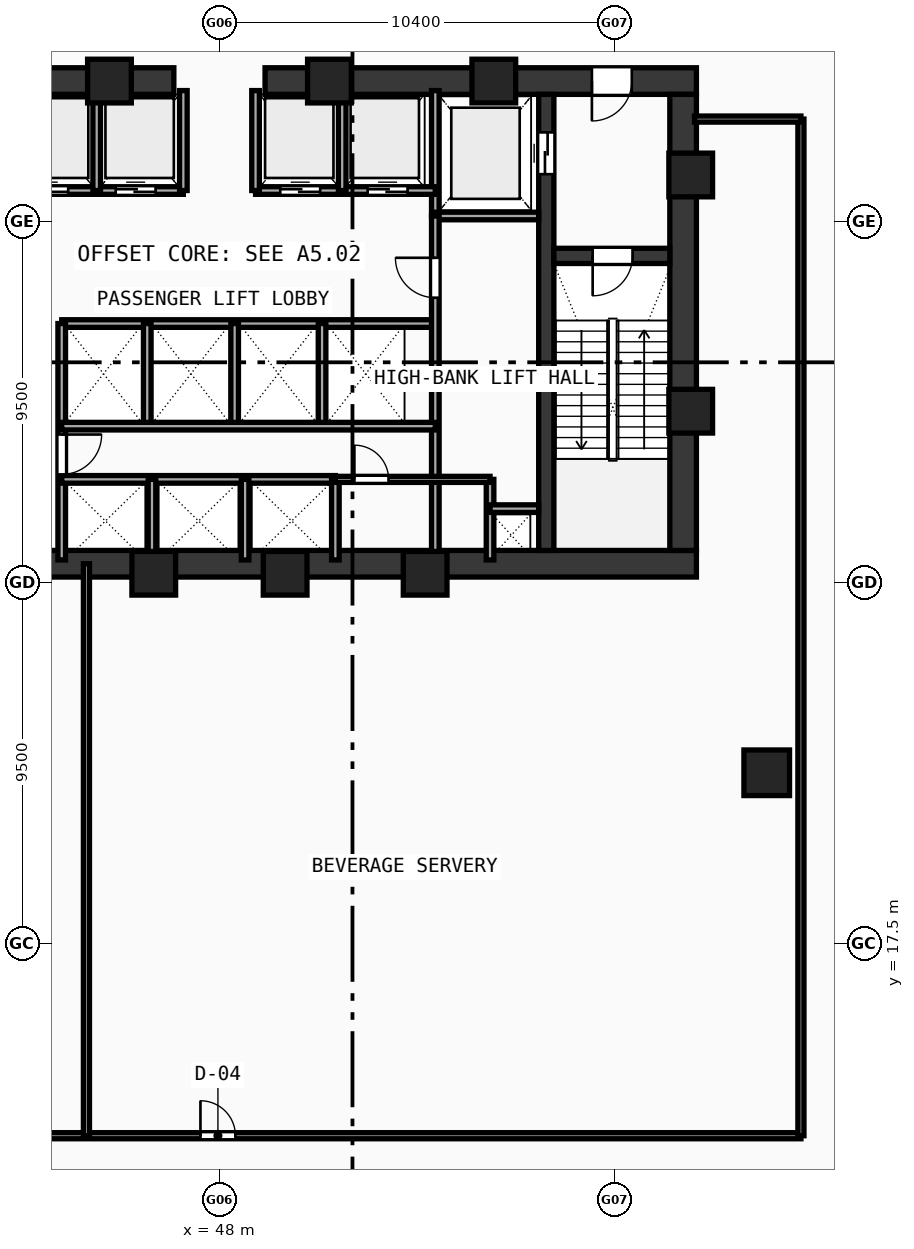
"""IFC4 building model, lengths in metres.
Left out: names, types, materials, properties, quantities, classifications, styles, units other than length and angle.
Written with IfcOpenShell. Run it as: python <this file> out.ifc"""

import sys

from ifc_helpers import new_model, si_unit, direction, frame, frame_2d, origin, origin_with_axes, origin_2d, place, context, subcontext, project, spatial, rectangle, hollow_rectangle, extrude, source, transform, mapped, element, fill, save


model = new_model("IFC4")
c1 = context("Model", 3, precision=1e-05, world=origin(), true_north=direction((0.0, 1.0)))
c2 = subcontext(c1, "Body", "Model", "MODEL_VIEW")
j1 = project(units=[si_unit("LENGTHUNIT", "METRE"), si_unit("PLANEANGLEUNIT", "RADIAN")], contexts=[c1])
p1 = place(None, origin())
s1 = spatial("IfcSite", under=j1, at=p1, CompositionType="ELEMENT")
p2 = place(p1, origin())
s2 = spatial("IfcBuilding", under=s1, at=p2, CompositionType="ELEMENT")
p3 = place(p2, frame((0.0, 0.0, 4.8)))
s3 = spatial("IfcBuildingStorey", under=s2, at=p3, CompositionType="ELEMENT", Elevation=4.8)
p4 = place(p3, frame((35.45, 27.5, 0.0), z_axis=(0.0, 0.0, 1.0), x_axis=(1.0, 0.0, 0.0)))
e1 = element("IfcWall", 1, at=p4, inside=s3, PredefinedType="SHEAR", context=c2, shape_type="SweptSolid", body=[
    extrude(rectangle(XDim=25.1, YDim=0.7, at=frame_2d((12.55, 0.0))), origin(), (0.0, 0.0, 1.0), 4.52),
])
p5 = place(p3, frame((35.45, 40.2, 0.0), z_axis=(0.0, 0.0, 1.0), x_axis=(1.0, 0.0, 0.0)))
e2 = element("IfcWall", 2, at=p5, inside=s3, PredefinedType="SHEAR", context=c2, shape_type="SweptSolid", body=[
    extrude(rectangle(XDim=11.35, YDim=0.7, at=frame_2d((5.675, 0.0))), origin(), (0.0, 0.0, 1.0), 4.52),
])
p6 = place(p5, frame((1.7, 0.0, 0.0)))
e3 = element("IfcOpeningElement", 3, at=p6, cuts=e2, PredefinedType="OPENING", context=c2, shape_type="SweptSolid", body=[
    extrude(rectangle(XDim=1.05, YDim=2.1, at=frame_2d((0.525, 1.05))), frame((0.0, 0.36, 0.0), z_axis=(0.0, -1.0, 0.0), x_axis=(1.0, 0.0, 0.0)), (0.0, 0.0, 1.0), 0.72),
])
p7 = place(p3, frame((49.2, 40.2, 0.0), z_axis=(0.0, 0.0, 1.0), x_axis=(1.0, 0.0, 0.0)))
e4 = element("IfcWall", 4, at=p7, inside=s3, PredefinedType="SHEAR", context=c2, shape_type="SweptSolid", body=[
    extrude(rectangle(XDim=11.35, YDim=0.7, at=frame_2d((5.675, 0.0))), origin(), (0.0, 0.0, 1.0), 4.52),
])
p8 = place(p7, frame((8.6, 0.0, 0.0)))
e5 = element("IfcOpeningElement", 5, at=p8, cuts=e4, PredefinedType="OPENING", context=c2, shape_type="SweptSolid", body=[
    extrude(rectangle(XDim=1.05, YDim=2.1, at=frame_2d((0.525, 1.05))), frame((0.0, 0.36, 0.0), z_axis=(0.0, -1.0, 0.0), x_axis=(1.0, 0.0, 0.0)), (0.0, 0.0, 1.0), 0.72),
])
p9 = place(p3, frame((60.2, 27.85, 0.0), z_axis=(0.0, 0.0, 1.0), x_axis=(0.0, 1.0, 0.0)))
e6 = element("IfcWall", 6, at=p9, inside=s3, PredefinedType="SHEAR", context=c2, shape_type="SweptSolid", body=[
    extrude(rectangle(XDim=12.0, YDim=0.7, at=frame_2d((6.0, 0.0))), origin(), (0.0, 0.0, 1.0), 4.52),
])
p10 = place(p3, frame((56.6, 27.85, 0.0), z_axis=(0.0, 0.0, 1.0), x_axis=(0.0, 1.0, 0.0)))
e7 = element("IfcWall", 7, at=p10, inside=s3, PredefinedType="SHEAR", context=c2, shape_type="SweptSolid", body=[
    extrude(rectangle(XDim=12.0, YDim=0.4, at=frame_2d((6.0, 0.0))), origin(), (0.0, 0.0, 1.0), 4.52),
])
p11 = place(p10, frame((9.9, 0.0, 0.0)))
e8 = element("IfcOpeningElement", 8, at=p11, cuts=e7, PredefinedType="OPENING", context=c2, shape_type="SweptSolid", body=[
    extrude(rectangle(XDim=1.1, YDim=2.1, at=frame_2d((0.55, 1.05))), frame((0.0, 0.21, 0.0), z_axis=(0.0, -1.0, 0.0), x_axis=(1.0, 0.0, 0.0)), (0.0, 0.0, 1.0), 0.42),
])
p12 = place(p3, frame((56.8, 35.6, 0.0), z_axis=(0.0, 0.0, 1.0), x_axis=(1.0, 0.0, 0.0)))
e9 = element("IfcWall", 9, at=p12, inside=s3, PredefinedType="SHEAR", context=c2, shape_type="SweptSolid", body=[
    extrude(rectangle(XDim=3.05, YDim=0.4, at=frame_2d((1.525, 0.0))), origin(), (0.0, 0.0, 1.0), 4.52),
])
p13 = place(p12, frame((1.02, 0.0, 0.0)))
e10 = element("IfcOpeningElement", 10, at=p13, cuts=e9, PredefinedType="OPENING", context=c2, shape_type="SweptSolid", body=[
    extrude(rectangle(XDim=1.05, YDim=2.1, at=frame_2d((0.525, 1.05))), frame((0.0, 0.21, 0.0), z_axis=(0.0, -1.0, 0.0), x_axis=(1.0, 0.0, 0.0)), (0.0, 0.0, 1.0), 0.42),
])
m1 = source(origin(), c2, "Body", "SweptSolid", [
    extrude(hollow_rectangle(XDim=1.15, YDim=1.15, WallThickness=0.048, at=origin_2d()), origin(), (0.0, 0.0, 1.0), 4.8),
])
for number, where, z_axis, x_axis in (
    (11, (46.272, 27.25, -0.28), (0.0, 0.0, 1.0), (1.0, 0.0, 0.0)),
    (12, (49.729, 27.25, -0.28), (0.0, 0.0, 1.0), (1.0, 0.0, 0.0)),
    (13, (53.412, 27.25, -0.28), (0.0, 0.0, 1.0), (1.0, 0.0, 0.0)),
    (14, (60.4, 31.513, -0.28), (0.0, 0.0, 1.0), (1.0, 0.0, 0.0)),
    (15, (60.4, 37.729, -0.28), (0.0, 0.0, 1.0), (1.0, 0.0, 0.0)),
    (16, (55.219, 40.2, -0.28), (0.0, 0.0, 1.0), (1.0, 0.0, 0.0)),
    (17, (50.894, 40.2, -0.28), (0.0, 0.0, 1.0), (1.0, 0.0, 0.0)),
    (18, (45.106, 40.2, -0.28), (0.0, 0.0, 1.0), (1.0, 0.0, 0.0)),
):
    element("IfcColumn", number, at=place(p3, frame(where, z_axis=z_axis, x_axis=x_axis)), inside=s3, PredefinedType="COLUMN", context=c2, shape_type="MappedRepresentation", body=[
        mapped(m1, transform((0.0, 0.0, 0.0), scale=1.0)),
    ])
m2 = source(origin(), c2, "Body", "SweptSolid", [
    extrude(hollow_rectangle(XDim=1.2, YDim=1.2, WallThickness=0.05, at=origin_2d()), origin(), (0.0, 0.0, 1.0), 4.8),
])
p14 = place(p3, frame((62.4, 22.0, -0.28), z_axis=(0.0, 0.0, 1.0), x_axis=(1.0, 0.0, 0.0)))
e19 = element("IfcColumn", 19, at=p14, inside=s3, PredefinedType="COLUMN", context=c2, shape_type="MappedRepresentation", body=[
    mapped(m2, transform((0.0, 0.0, 0.0), scale=1.0)),
])
p15 = place(p3, frame((53.68, 36.65, 0.0), z_axis=(0.0, 0.0, 1.0), x_axis=(0.0, 1.0, 0.0)))
e20 = element("IfcWall", 20, at=p15, inside=s3, PredefinedType="SOLIDWALL", context=c2, shape_type="SweptSolid", body=[
    extrude(rectangle(XDim=3.3, YDim=0.2, at=frame_2d((1.65, 0.0))), origin(), (0.0, 0.0, 1.0), 4.52),
])
p16 = place(p3, frame((53.68, 36.65, 0.0), z_axis=(0.0, 0.0, 1.0), x_axis=(1.0, 0.0, 0.0)))
e21 = element("IfcWall", 21, at=p16, inside=s3, PredefinedType="SOLIDWALL", context=c2, shape_type="SweptSolid", body=[
    extrude(rectangle(XDim=2.72, YDim=0.2, at=frame_2d((1.36, 0.0))), origin(), (0.0, 0.0, 1.0), 4.52),
])
p17 = place(p3, frame((42.32, 37.32, 0.0), z_axis=(0.0, 0.0, 1.0), x_axis=(1.0, 0.0, 0.0)))
e22 = element("IfcWall", 22, at=p17, inside=s3, PredefinedType="SOLIDWALL", context=c2, shape_type="SweptSolid", body=[
    extrude(rectangle(XDim=4.73, YDim=0.2, at=frame_2d((2.365, 0.0))), origin(), (0.0, 0.0, 1.0), 4.52),
])
p18 = place(p17, frame((0.65, 0.0, 0.0)))
e23 = element("IfcOpeningElement", 23, at=p18, cuts=e22, PredefinedType="OPENING", context=c2, shape_type="SweptSolid", body=[
    extrude(rectangle(XDim=1.05, YDim=2.1, at=frame_2d((0.525, 1.05))), frame((0.0, 0.11, 0.0), z_axis=(0.0, -1.0, 0.0), x_axis=(1.0, 0.0, 0.0)), (0.0, 0.0, 1.0), 0.22),
])
p19 = place(p17, frame((2.95, 0.0, 0.0)))
e24 = element("IfcOpeningElement", 24, at=p19, cuts=e22, PredefinedType="OPENING", context=c2, shape_type="SweptSolid", body=[
    extrude(rectangle(XDim=1.05, YDim=2.1, at=frame_2d((0.525, 1.05))), frame((0.0, 0.11, 0.0), z_axis=(0.0, -1.0, 0.0), x_axis=(1.0, 0.0, 0.0)), (0.0, 0.0, 1.0), 0.22),
])
p20 = place(p3, frame((48.95, 37.32, 0.0), z_axis=(0.0, 0.0, 1.0), x_axis=(1.0, 0.0, 0.0)))
e25 = element("IfcWall", 25, at=p20, inside=s3, PredefinedType="SOLIDWALL", context=c2, shape_type="SweptSolid", body=[
    extrude(rectangle(XDim=4.73, YDim=0.2, at=frame_2d((2.365, 0.0))), origin(), (0.0, 0.0, 1.0), 4.52),
])
p21 = place(p20, frame((0.65, 0.0, 0.0)))
e26 = element("IfcOpeningElement", 26, at=p21, cuts=e25, PredefinedType="OPENING", context=c2, shape_type="SweptSolid", body=[
    extrude(rectangle(XDim=1.05, YDim=2.1, at=frame_2d((0.525, 1.05))), frame((0.0, 0.11, 0.0), z_axis=(0.0, -1.0, 0.0), x_axis=(1.0, 0.0, 0.0)), (0.0, 0.0, 1.0), 0.22),
])
p22 = place(p20, frame((2.95, 0.0, 0.0)))
e27 = element("IfcOpeningElement", 27, at=p22, cuts=e25, PredefinedType="OPENING", context=c2, shape_type="SweptSolid", body=[
    extrude(rectangle(XDim=1.05, YDim=2.1, at=frame_2d((0.525, 1.05))), frame((0.0, 0.11, 0.0), z_axis=(0.0, -1.0, 0.0), x_axis=(1.0, 0.0, 0.0)), (0.0, 0.0, 1.0), 0.22),
])
for number, where, z_axis, x_axis in (
    (28, (47.05, 37.32, 0.0), (0.0, 0.0, 1.0), (0.0, 1.0, 0.0)),
    (29, (48.95, 37.32, 0.0), (0.0, 0.0, 1.0), (0.0, 1.0, 0.0)),
    (30, (44.77, 37.32, 0.0), (0.0, 0.0, 1.0), (0.0, 1.0, 0.0)),
    (31, (51.23, 37.32, 0.0), (0.0, 0.0, 1.0), (0.0, 1.0, 0.0)),
):
    element("IfcWall", number, at=place(p3, frame(where, z_axis=z_axis, x_axis=x_axis)), inside=s3, PredefinedType="SOLIDWALL", context=c2, shape_type="SweptSolid", body=[
        extrude(rectangle(XDim=2.63, YDim=0.2, at=frame_2d((1.315, 0.0))), origin(), (0.0, 0.0, 1.0), 4.52),
    ])
p23 = place(p3, frame((43.85, 33.82, 0.0), z_axis=(0.0, 0.0, 1.0), x_axis=(1.0, 0.0, 0.0)))
e32 = element("IfcWall", 32, at=p23, inside=s3, PredefinedType="SOLIDWALL", context=c2, shape_type="SweptSolid", body=[
    extrude(rectangle(XDim=9.83, YDim=0.2, at=frame_2d((4.915, 0.0))), origin(), (0.0, 0.0, 1.0), 4.52),
])
p24 = place(p3, frame((43.85, 27.6, 0.0), z_axis=(0.0, 0.0, 1.0), x_axis=(0.0, 1.0, 0.0)))
e33 = element("IfcWall", 33, at=p24, inside=s3, PredefinedType="SOLIDWALL", context=c2, shape_type="SweptSolid", body=[
    extrude(rectangle(XDim=6.22, YDim=0.2, at=frame_2d((3.11, 0.0))), origin(), (0.0, 0.0, 1.0), 4.52),
])
p25 = place(p24, frame((2.25, 0.0, 0.0)))
e34 = element("IfcOpeningElement", 34, at=p25, cuts=e33, PredefinedType="OPENING", context=c2, shape_type="SweptSolid", body=[
    extrude(rectangle(XDim=1.05, YDim=2.1, at=frame_2d((0.525, 1.05))), frame((0.0, 0.11, 0.0), z_axis=(0.0, -1.0, 0.0), x_axis=(1.0, 0.0, 0.0)), (0.0, 0.0, 1.0), 0.22),
])
p26 = place(p3, frame((53.68, 27.6, 0.0), z_axis=(0.0, 0.0, 1.0), x_axis=(0.0, 1.0, 0.0)))
e35 = element("IfcWall", 35, at=p26, inside=s3, PredefinedType="SOLIDWALL", context=c2, shape_type="SweptSolid", body=[
    extrude(rectangle(XDim=9.05, YDim=0.2, at=frame_2d((4.525, 0.0))), origin(), (0.0, 0.0, 1.0), 4.52),
])
p27 = place(p26, frame((6.9, 0.0, 0.0)))
e36 = element("IfcOpeningElement", 36, at=p27, cuts=e35, PredefinedType="OPENING", context=c2, shape_type="SweptSolid", body=[
    extrude(rectangle(XDim=1.05, YDim=2.1, at=frame_2d((0.525, 1.05))), frame((0.0, 0.11, 0.0), z_axis=(0.0, -1.0, 0.0), x_axis=(1.0, 0.0, 0.0)), (0.0, 0.0, 1.0), 0.22),
])
for number, where, z_axis, x_axis in (
    (37, (46.1, 31.12, 0.0), (0.0, 0.0, 1.0), (0.0, 1.0, 0.0)),
    (38, (48.4, 31.12, 0.0), (0.0, 0.0, 1.0), (0.0, 1.0, 0.0)),
    (39, (50.7, 31.12, 0.0), (0.0, 0.0, 1.0), (0.0, 1.0, 0.0)),
):
    element("IfcWall", number, at=place(p3, frame(where, z_axis=z_axis, x_axis=x_axis)), inside=s3, PredefinedType="SOLIDWALL", context=c2, shape_type="SweptSolid", body=[
        extrude(rectangle(XDim=2.7, YDim=0.2, at=frame_2d((1.35, 0.0))), origin(), (0.0, 0.0, 1.0), 4.52),
    ])
p28 = place(p3, frame((43.85, 29.72, 0.0), z_axis=(0.0, 0.0, 1.0), x_axis=(1.0, 0.0, 0.0)))
e40 = element("IfcWall", 40, at=p28, inside=s3, PredefinedType="SOLIDWALL", context=c2, shape_type="SweptSolid", body=[
    extrude(rectangle(XDim=7.2, YDim=0.2, at=frame_2d((3.6, 0.0))), origin(), (0.0, 0.0, 1.0), 4.52),
])
p29 = place(p3, frame((51.05, 27.6, 0.0), z_axis=(0.0, 0.0, 1.0), x_axis=(0.0, 1.0, 0.0)))
e41 = element("IfcWall", 41, at=p29, inside=s3, PredefinedType="SOLIDWALL", context=c2, shape_type="SweptSolid", body=[
    extrude(rectangle(XDim=2.12, YDim=0.2, at=frame_2d((1.06, 0.0))), origin(), (0.0, 0.0, 1.0), 4.52),
])
p30 = place(p3, frame((43.85, 31.12, 0.0), z_axis=(0.0, 0.0, 1.0), x_axis=(1.0, 0.0, 0.0)))
e42 = element("IfcWall", 42, at=p30, inside=s3, PredefinedType="SOLIDWALL", context=c2, shape_type="SweptSolid", body=[
    extrude(rectangle(XDim=9.83, YDim=0.2, at=frame_2d((4.915, 0.0))), origin(), (0.0, 0.0, 1.0), 4.52),
])
for number, where, z_axis, x_axis in (
    (43, (46.225, 27.6, 0.0), (0.0, 0.0, 1.0), (0.0, 1.0, 0.0)),
    (44, (48.675, 27.6, 0.0), (0.0, 0.0, 1.0), (0.0, 1.0, 0.0)),
    (45, (55.12, 27.6, 0.0), (0.0, 0.0, 1.0), (0.0, 1.0, 0.0)),
):
    element("IfcWall", number, at=place(p3, frame(where, z_axis=z_axis, x_axis=x_axis)), inside=s3, PredefinedType="SOLIDWALL", context=c2, shape_type="SweptSolid", body=[
        extrude(rectangle(XDim=2.12, YDim=0.2, at=frame_2d((1.06, 0.0))), origin(), (0.0, 0.0, 1.0), 4.52),
    ])
p31 = place(p3, frame((55.12, 28.95, 0.0), z_axis=(0.0, 0.0, 1.0), x_axis=(1.0, 0.0, 0.0)))
e46 = element("IfcWall", 46, at=p31, inside=s3, PredefinedType="SOLIDWALL", context=c2, shape_type="SweptSolid", body=[
    extrude(rectangle(XDim=1.28, YDim=0.2, at=frame_2d((0.64, 0.0))), origin(), (0.0, 0.0, 1.0), 4.52),
])
p32 = place(p3, frame((51.05, 29.72, 0.0), z_axis=(0.0, 0.0, 1.0), x_axis=(1.0, 0.0, 0.0)))
e47 = element("IfcWall", 47, at=p32, inside=s3, PredefinedType="PARTITIONING", context=c2, shape_type="SweptSolid", body=[
    extrude(rectangle(XDim=4.07, YDim=0.16, at=frame_2d((2.035, 0.0))), origin(), (0.0, 0.0, 1.0), 4.52),
])
p33 = place(p32, frame((0.5, 0.0, 0.0)))
e48 = element("IfcOpeningElement", 48, at=p33, cuts=e47, PredefinedType="OPENING", context=c2, shape_type="SweptSolid", body=[
    extrude(rectangle(XDim=0.9, YDim=2.1, at=frame_2d((0.45, 1.05))), frame((0.0, 0.09, 0.0), z_axis=(0.0, -1.0, 0.0), x_axis=(1.0, 0.0, 0.0)), (0.0, 0.0, 1.0), 0.18),
])
p34 = place(p3, frame((32.7, 12.45, 0.0), z_axis=(0.0, 0.0, 1.0), x_axis=(1.0, 0.0, 0.0)))
e49 = element("IfcWall", 49, at=p34, inside=s3, PredefinedType="PARTITIONING", context=c2, shape_type="SweptSolid", body=[
    extrude(rectangle(XDim=30.6, YDim=0.16, at=frame_2d((15.3, 0.0))), origin(), (0.0, 0.0, 1.0), 3.62),
])
p35 = place(p34, frame((14.8, 0.0, 0.0)))
e50 = element("IfcOpeningElement", 50, at=p35, cuts=e49, PredefinedType="OPENING", context=c2, shape_type="SweptSolid", body=[
    extrude(rectangle(XDim=0.92, YDim=2.1, at=frame_2d((0.46, 1.05))), frame((0.0, 0.09, 0.0), z_axis=(0.0, -1.0, 0.0), x_axis=(1.0, 0.0, 0.0)), (0.0, 0.0, 1.0), 0.18),
])
p36 = place(p34, frame((5.9, 0.0, 0.0)))
e51 = element("IfcOpeningElement", 51, at=p36, cuts=e49, PredefinedType="OPENING", context=c2, shape_type="SweptSolid", body=[
    extrude(rectangle(XDim=0.94, YDim=2.1, at=frame_2d((0.47, 1.05))), frame((0.0, 0.09, 0.0), z_axis=(0.0, -1.0, 0.0), x_axis=(1.0, 0.0, 0.0)), (0.0, 0.0, 1.0), 0.18),
])
p37 = place(p3, frame((63.3, 12.45, 0.0), z_axis=(0.0, 0.0, 1.0), x_axis=(0.0, 1.0, 0.0)))
e52 = element("IfcWall", 52, at=p37, inside=s3, PredefinedType="PARTITIONING", context=c2, shape_type="SweptSolid", body=[
    extrude(rectangle(XDim=26.75, YDim=0.16, at=frame_2d((13.375, 0.0))), origin(), (0.0, 0.0, 1.0), 3.62),
])
p38 = place(p3, frame((60.5, 39.2, 0.0), z_axis=(0.0, 0.0, 1.0), x_axis=(1.0, 0.0, 0.0)))
e53 = element("IfcWall", 53, at=p38, inside=s3, PredefinedType="PARTITIONING", context=c2, shape_type="SweptSolid", body=[
    extrude(rectangle(XDim=2.8, YDim=0.16, at=frame_2d((1.4, 0.0))), origin(), (0.0, 0.0, 1.0), 3.62),
])
p39 = place(p3, frame((44.5, 12.45, 0.0), z_axis=(0.0, 0.0, 1.0), x_axis=(0.0, 1.0, 0.0)))
e54 = element("IfcWall", 54, at=p39, inside=s3, PredefinedType="PARTITIONING", context=c2, shape_type="SweptSolid", body=[
    extrude(rectangle(XDim=15.05, YDim=0.16, at=frame_2d((7.525, 0.0))), origin(), (0.0, 0.0, 1.0), 3.62),
])
m3 = source(origin(), c2, "Body", "SweptSolid", [
    extrude(rectangle(XDim=1.05, YDim=2.1, at=frame_2d((0.525, 1.05))), frame((0.0, 0.025, 0.0), z_axis=(0.0, -1.0, 0.0), x_axis=(1.0, 0.0, 0.0)), (0.0, 0.0, 1.0), 0.05),
])
p40 = place(p13, frame((1.05, 0.0, 0.0), z_axis=(0.0, 0.0, 1.0), x_axis=(-1.0, 0.0, 0.0)))
e55 = element("IfcDoor", 55, at=p40, inside=s3, OperationType="SINGLE_SWING_RIGHT", PredefinedType="DOOR", context=c2, shape_type="MappedRepresentation", body=[
    mapped(m3, transform((0.0, 0.0, 0.0), scale=1.0)),
])
fill(e10, e55)
p41 = place(p8, frame((1.05, 0.0, 0.0), z_axis=(0.0, 0.0, 1.0), x_axis=(-1.0, 0.0, 0.0)))
e56 = element("IfcDoor", 56, at=p41, inside=s3, OperationType="SINGLE_SWING_RIGHT", PredefinedType="DOOR", context=c2, shape_type="MappedRepresentation", body=[
    mapped(m3, transform((0.0, 0.0, 0.0), scale=1.0)),
])
fill(e5, e56)
m4 = source(origin(), c2, "Body", "SweptSolid", [
    extrude(rectangle(XDim=1.1, YDim=2.1, at=frame_2d((0.55, 1.05))), frame((0.0, 0.025, 0.0), z_axis=(0.0, -1.0, 0.0), x_axis=(1.0, 0.0, 0.0)), (0.0, 0.0, 1.0), 0.05),
])
p42 = place(p11, origin_with_axes())
e57 = element("IfcDoor", 57, at=p42, inside=s3, OperationType="DOUBLE_DOOR_SLIDING", PredefinedType="DOOR", context=c2, shape_type="MappedRepresentation", body=[
    mapped(m4, transform((0.0, 0.0, 0.0), scale=1.0)),
])
fill(e8, e57)
p43 = place(p18, frame((1.05, 0.0, 0.0), z_axis=(0.0, 0.0, 1.0), x_axis=(-1.0, 0.0, 0.0)))
e58 = element("IfcDoor", 58, at=p43, inside=s3, OperationType="DOUBLE_DOOR_SLIDING", PredefinedType="DOOR", context=c2, shape_type="MappedRepresentation", body=[
    mapped(m3, transform((0.0, 0.0, 0.0), scale=1.0)),
])
fill(e23, e58)
p44 = place(p19, frame((1.05, 0.0, 0.0), z_axis=(0.0, 0.0, 1.0), x_axis=(-1.0, 0.0, 0.0)))
e59 = element("IfcDoor", 59, at=p44, inside=s3, OperationType="DOUBLE_DOOR_SLIDING", PredefinedType="DOOR", context=c2, shape_type="MappedRepresentation", body=[
    mapped(m3, transform((0.0, 0.0, 0.0), scale=1.0)),
])
fill(e24, e59)
p45 = place(p21, frame((1.05, 0.0, 0.0), z_axis=(0.0, 0.0, 1.0), x_axis=(-1.0, 0.0, 0.0)))
e60 = element("IfcDoor", 60, at=p45, inside=s3, OperationType="DOUBLE_DOOR_SLIDING", PredefinedType="DOOR", context=c2, shape_type="MappedRepresentation", body=[
    mapped(m3, transform((0.0, 0.0, 0.0), scale=1.0)),
])
fill(e26, e60)
p46 = place(p22, frame((1.05, 0.0, 0.0), z_axis=(0.0, 0.0, 1.0), x_axis=(-1.0, 0.0, 0.0)))
e61 = element("IfcDoor", 61, at=p46, inside=s3, OperationType="DOUBLE_DOOR_SLIDING", PredefinedType="DOOR", context=c2, shape_type="MappedRepresentation", body=[
    mapped(m3, transform((0.0, 0.0, 0.0), scale=1.0)),
])
fill(e27, e61)
p47 = place(p25, frame((1.05, 0.0, 0.0), z_axis=(0.0, 0.0, 1.0), x_axis=(-1.0, 0.0, 0.0)))
e62 = element("IfcDoor", 62, at=p47, inside=s3, OperationType="SINGLE_SWING_LEFT", PredefinedType="DOOR", context=c2, shape_type="MappedRepresentation", body=[
    mapped(m3, transform((0.0, 0.0, 0.0), scale=1.0)),
])
fill(e34, e62)
p48 = place(p27, origin_with_axes())
e63 = element("IfcDoor", 63, at=p48, inside=s3, OperationType="SINGLE_SWING_RIGHT", PredefinedType="DOOR", context=c2, shape_type="MappedRepresentation", body=[
    mapped(m3, transform((0.0, 0.0, 0.0), scale=1.0)),
])
fill(e36, e63)
m5 = source(origin(), c2, "Body", "SweptSolid", [
    extrude(rectangle(XDim=0.9, YDim=2.1, at=frame_2d((0.45, 1.05))), frame((0.0, 0.025, 0.0), z_axis=(0.0, -1.0, 0.0), x_axis=(1.0, 0.0, 0.0)), (0.0, 0.0, 1.0), 0.05),
])
p49 = place(p33, origin_with_axes())
e64 = element("IfcDoor", 64, at=p49, inside=s3, OperationType="SINGLE_SWING_LEFT", PredefinedType="DOOR", context=c2, shape_type="MappedRepresentation", body=[
    mapped(m5, transform((0.0, 0.0, 0.0), scale=1.0)),
])
fill(e48, e64)
m6 = source(origin(), c2, "Body", "SweptSolid", [
    extrude(rectangle(XDim=0.92, YDim=2.1, at=frame_2d((0.46, 1.05))), frame((0.0, 0.025, 0.0), z_axis=(0.0, -1.0, 0.0), x_axis=(1.0, 0.0, 0.0)), (0.0, 0.0, 1.0), 0.05),
])
p50 = place(p35, origin_with_axes())
e65 = element("IfcDoor", 65, at=p50, inside=s3, OperationType="SINGLE_SWING_LEFT", PredefinedType="DOOR", context=c2, shape_type="MappedRepresentation", body=[
    mapped(m6, transform((0.0, 0.0, 0.0), scale=1.0)),
])
fill(e50, e65)
save(model, sys.argv[1])
